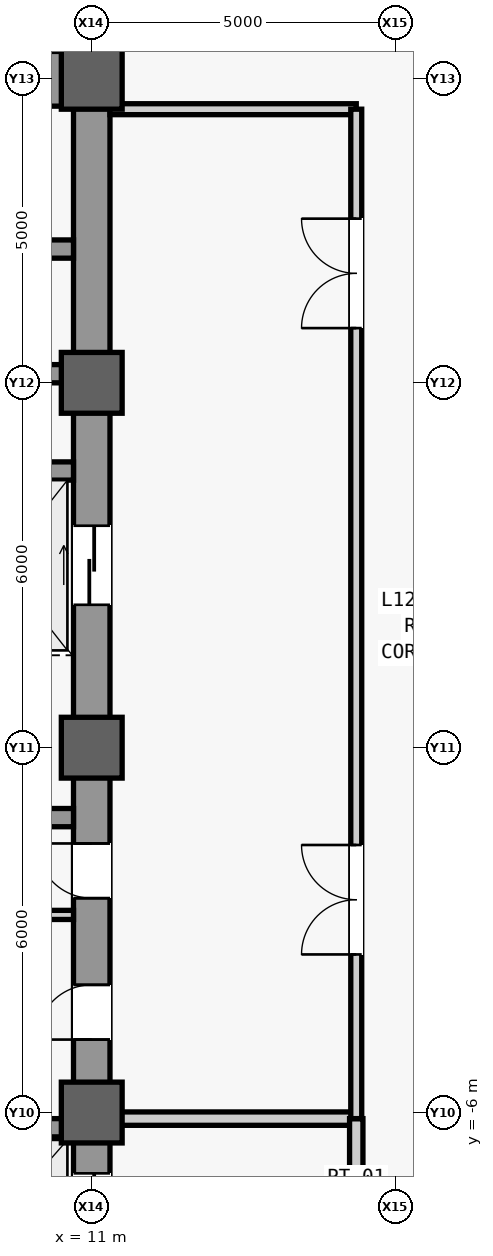
"""IFC4 building model, lengths in metres.
Left out: names, types, materials, properties, quantities, classifications, styles, units other than length and angle.
Written with IfcOpenShell. Run it as: python <this file> out.ifc"""

import sys

from ifc_helpers import new_model, si_unit, direction, frame, frame_2d, origin, origin_2d, place, context, subcontext, project, spatial, rectangle, extrude, source, transform, mapped, element, fill, save


model = new_model("IFC4")
c1 = context("Model", 3, precision=1e-05, world=origin(), true_north=direction((0.0, 1.0)))
c2 = subcontext(c1, "Body", "Model", "MODEL_VIEW")
j1 = project(units=[si_unit("LENGTHUNIT", "METRE"), si_unit("PLANEANGLEUNIT", "RADIAN")], contexts=[c1])
p1 = place(None, origin())
s1 = spatial("IfcSite", under=j1, at=p1, CompositionType="ELEMENT")
p2 = place(p1, origin())
s2 = spatial("IfcBuilding", under=s1, at=p2, CompositionType="ELEMENT")
p3 = place(p2, frame((0.0, 0.0, 57.8)))
s3 = spatial("IfcBuildingStorey", under=s2, at=p3, CompositionType="ELEMENT", Elevation=57.8)
m1 = source(origin(), c2, "Body", "SweptSolid", [
    extrude(rectangle(XDim=22.0, YDim=0.6, at=frame_2d((11.0, 0.0))), origin(), (0.0, 0.0, 1.0), 3.94),
])
p4 = place(p3, frame((11.0, -11.0, 0.0), z_axis=(0.0, 0.0, 1.0), x_axis=(0.0, 1.0, 0.0)))
e1 = element("IfcWall", 1, at=p4, inside=s3, PredefinedType="SHEAR", context=c2, shape_type="MappedRepresentation", body=[
    mapped(m1, transform((0.0, 0.0, 0.0), scale=1.0)),
])
m2 = source(origin(), c2, "Body", "SweptSolid", [
    extrude(rectangle(XDim=1.1, YDim=2.2, at=frame_2d((0.55, 1.1))), frame((0.0, 0.31, 0.0), z_axis=(0.0, -1.0, 0.0), x_axis=(1.0, 0.0, 0.0)), (0.0, 0.0, 1.0), 0.62),
])
p5 = place(p4, frame((0.8, 0.0, 0.0)))
e2 = element("IfcOpeningElement", 2, at=p5, cuts=e1, PredefinedType="OPENING", context=c2, shape_type="MappedRepresentation", body=[
    mapped(m2, transform((0.0, 0.0, 0.0), scale=1.0)),
])
m3 = source(origin(), c2, "Body", "SweptSolid", [
    extrude(rectangle(XDim=0.9, YDim=2.15, at=frame_2d((0.45, 1.075))), frame((0.0, 0.31, 0.0), z_axis=(0.0, -1.0, 0.0), x_axis=(1.0, 0.0, 0.0)), (0.0, 0.0, 1.0), 0.62),
])
p6 = place(p4, frame((6.2, 0.0, 0.0)))
e3 = element("IfcOpeningElement", 3, at=p6, cuts=e1, PredefinedType="OPENING", context=c2, shape_type="MappedRepresentation", body=[
    mapped(m3, transform((0.0, 0.0, 0.0), scale=1.0)),
])
p7 = place(p4, frame((8.525, 0.0, 0.0)))
e4 = element("IfcOpeningElement", 4, at=p7, cuts=e1, PredefinedType="OPENING", context=c2, shape_type="MappedRepresentation", body=[
    mapped(m3, transform((0.0, 0.0, 0.0), scale=1.0)),
])
m4 = source(origin(), c2, "Body", "SweptSolid", [
    extrude(rectangle(XDim=1.3, YDim=2.3, at=frame_2d((0.65, 1.15))), frame((0.0, 0.31, 0.0), z_axis=(0.0, -1.0, 0.0), x_axis=(1.0, 0.0, 0.0)), (0.0, 0.0, 1.0), 0.62),
])
p8 = place(p4, frame((2.7, 0.0, 0.0)))
e5 = element("IfcOpeningElement", 5, at=p8, cuts=e1, PredefinedType="OPENING", context=c2, shape_type="MappedRepresentation", body=[
    mapped(m4, transform((0.0, 0.0, 0.0), scale=1.0)),
])
p9 = place(p4, frame((13.35, 0.0, 0.0)))
e6 = element("IfcOpeningElement", 6, at=p9, cuts=e1, PredefinedType="OPENING", context=c2, shape_type="MappedRepresentation", body=[
    mapped(m4, transform((0.0, 0.0, 0.0), scale=1.0)),
])
m5 = source(origin(), c2, "Body", "SweptSolid", [
    extrude(rectangle(XDim=5.85, YDim=0.9, at=frame_2d((2.925, 0.0))), origin(), (0.0, 0.0, 1.0), 3.94),
])
p10 = place(p3, frame((4.85, 11.0, 0.0), z_axis=(0.0, 0.0, 1.0), x_axis=(1.0, 0.0, 0.0)))
e7 = element("IfcWall", 7, at=p10, inside=s3, PredefinedType="SHEAR", context=c2, shape_type="MappedRepresentation", body=[
    mapped(m5, transform((0.0, 0.0, 0.0), scale=1.0)),
])
m6 = source(origin(), c2, "Body", "SweptSolid", [
    extrude(rectangle(XDim=1.05, YDim=2.2, at=frame_2d((0.525, 1.1))), frame((0.0, 0.46, 0.0), z_axis=(0.0, -1.0, 0.0), x_axis=(1.0, 0.0, 0.0)), (0.0, 0.0, 1.0), 0.92),
])
p11 = place(p10, frame((1.375, 0.0, 0.0)))
e8 = element("IfcOpeningElement", 8, at=p11, cuts=e7, PredefinedType="OPENING", context=c2, shape_type="MappedRepresentation", body=[
    mapped(m6, transform((0.0, 0.0, 0.0), scale=1.0)),
])
m7 = source(origin(), c2, "Body", "SweptSolid", [
    extrude(rectangle(XDim=5.6, YDim=0.3, at=frame_2d((2.8, 0.0))), origin(), (0.0, 0.0, 1.0), 3.94),
])
p12 = place(p3, frame((5.1, -1.15, 0.0), z_axis=(0.0, 0.0, 1.0), x_axis=(1.0, 0.0, 0.0)))
e9 = element("IfcWall", 9, at=p12, inside=s3, PredefinedType="SHEAR", context=c2, shape_type="MappedRepresentation", body=[
    mapped(m7, transform((0.0, 0.0, 0.0), scale=1.0)),
])
m8 = source(origin(), c2, "Body", "SweptSolid", [
    extrude(rectangle(XDim=1.0, YDim=1.0, at=origin_2d()), origin(), (0.0, 0.0, 1.0), 4.2),
])
for number, where, z_axis, x_axis in (
    (10, (11.0, -6.0, 0.0), (0.0, 0.0, 1.0), (1.0, 0.0, 0.0)),
    (11, (11.0, 0.0, 0.0), (0.0, 0.0, 1.0), (1.0, 0.0, 0.0)),
    (12, (11.0, 6.0, 0.0), (0.0, 0.0, 1.0), (1.0, 0.0, 0.0)),
    (13, (11.0, 11.0, 0.0), (0.0, 0.0, 1.0), (1.0, 0.0, 0.0)),
):
    element("IfcColumn", number, at=place(p3, frame(where, z_axis=z_axis, x_axis=x_axis)), inside=s3, PredefinedType="COLUMN", context=c2, shape_type="MappedRepresentation", body=[
        mapped(m8, transform((0.0, 0.0, 0.0), scale=1.0)),
    ])
m9 = source(origin(), c2, "Body", "SweptSolid", [
    extrude(rectangle(XDim=2.2, YDim=0.3, at=frame_2d((1.1, 0.0))), origin(), (0.0, 0.0, 1.0), 3.94),
])
p13 = place(p3, frame((8.5, -6.25, 0.0), z_axis=(0.0, 0.0, 1.0), x_axis=(1.0, 0.0, 0.0)))
e14 = element("IfcWall", 14, at=p13, inside=s3, PredefinedType="SHEAR", context=c2, shape_type="MappedRepresentation", body=[
    mapped(m9, transform((0.0, 0.0, 0.0), scale=1.0)),
])
m10 = source(origin(), c2, "Body", "SweptSolid", [
    extrude(rectangle(XDim=2.3, YDim=0.3, at=frame_2d((1.15, 0.0))), origin(), (0.0, 0.0, 1.0), 3.94),
])
for number, where, z_axis, x_axis in (
    (15, (8.4, 4.55, 0.0), (0.0, 0.0, 1.0), (1.0, 0.0, 0.0)),
    (16, (8.4, 6.15, 0.0), (0.0, 0.0, 1.0), (1.0, 0.0, 0.0)),
    (17, (8.4, 8.2, 0.0), (0.0, 0.0, 1.0), (1.0, 0.0, 0.0)),
):
    element("IfcWall", number, at=place(p3, frame(where, z_axis=z_axis, x_axis=x_axis)), inside=s3, PredefinedType="SHEAR", context=c2, shape_type="MappedRepresentation", body=[
        mapped(m10, transform((0.0, 0.0, 0.0), scale=1.0)),
    ])
m11 = source(origin(), c2, "Body", "SweptSolid", [
    extrude(rectangle(XDim=2.05, YDim=0.15, at=frame_2d((1.025, 0.0))), origin(), (0.0, 0.0, 1.0), 3.94),
])
p14 = place(p3, frame((8.65, -2.75, 0.0), z_axis=(0.0, 0.0, 1.0), x_axis=(1.0, 0.0, 0.0)))
e18 = element("IfcWall", 18, at=p14, inside=s3, PredefinedType="PARTITIONING", context=c2, shape_type="MappedRepresentation", body=[
    mapped(m11, transform((0.0, 0.0, 0.0), scale=1.0)),
])
m12 = source(origin(), c2, "Body", "SweptSolid", [
    extrude(rectangle(XDim=4.05, YDim=0.22, at=frame_2d((2.025, 0.0))), origin(), (0.0, 0.0, 1.0), 3.085),
])
p15 = place(p3, frame((11.3, -6.1, 0.0), z_axis=(0.0, 0.0, 1.0), x_axis=(1.0, 0.0, 0.0)))
e19 = element("IfcWall", 19, at=p15, inside=s3, PredefinedType="PARTITIONING", context=c2, shape_type="MappedRepresentation", body=[
    mapped(m12, transform((0.0, 0.0, 0.0), scale=1.0)),
])
m13 = source(origin(), c2, "Body", "SweptSolid", [
    extrude(rectangle(XDim=4.4, YDim=0.22, at=frame_2d((2.2, 0.0))), origin(), (0.0, 0.0, 1.0), 3.94),
])
p16 = place(p3, frame((15.35, -10.5, 0.0), z_axis=(0.0, 0.0, 1.0), x_axis=(0.0, 1.0, 0.0)))
e20 = element("IfcWall", 20, at=p16, inside=s3, PredefinedType="PARTITIONING", context=c2, shape_type="MappedRepresentation", body=[
    mapped(m13, transform((0.0, 0.0, 0.0), scale=1.0)),
])
m14 = source(origin(), c2, "Body", "SweptSolid", [
    extrude(rectangle(XDim=1.2, YDim=2.2, at=frame_2d((0.6, 1.1))), frame((0.0, 0.12, 0.0), z_axis=(0.0, -1.0, 0.0), x_axis=(1.0, 0.0, 0.0)), (0.0, 0.0, 1.0), 0.24),
])
p17 = place(p16, frame((1.6, 0.0, 0.0)))
e21 = element("IfcOpeningElement", 21, at=p17, cuts=e20, PredefinedType="OPENING", context=c2, shape_type="MappedRepresentation", body=[
    mapped(m14, transform((0.0, 0.0, 0.0), scale=1.0)),
])
m15 = source(origin(), c2, "Body", "SweptSolid", [
    extrude(rectangle(XDim=4.05, YDim=0.18, at=frame_2d((2.025, 0.0))), origin(), (0.0, 0.0, 1.0), 3.94),
])
p18 = place(p3, frame((11.3, 10.5, 0.0), z_axis=(0.0, 0.0, 1.0), x_axis=(1.0, 0.0, 0.0)))
e22 = element("IfcWall", 22, at=p18, inside=s3, PredefinedType="PARTITIONING", context=c2, shape_type="MappedRepresentation", body=[
    mapped(m15, transform((0.0, 0.0, 0.0), scale=1.0)),
])
m16 = source(origin(), c2, "Body", "SweptSolid", [
    extrude(rectangle(XDim=16.6, YDim=0.18, at=frame_2d((8.3, 0.0))), origin(), (0.0, 0.0, 1.0), 3.94),
])
p19 = place(p3, frame((15.35, -6.1, 0.0), z_axis=(0.0, 0.0, 1.0), x_axis=(0.0, 1.0, 0.0)))
e23 = element("IfcWall", 23, at=p19, inside=s3, PredefinedType="PARTITIONING", context=c2, shape_type="MappedRepresentation", body=[
    mapped(m16, transform((0.0, 0.0, 0.0), scale=1.0)),
])
m17 = source(origin(), c2, "Body", "SweptSolid", [
    extrude(rectangle(XDim=1.8, YDim=2.25, at=frame_2d((0.9, 1.125))), frame((0.0, 0.1, 0.0), z_axis=(0.0, -1.0, 0.0), x_axis=(1.0, 0.0, 0.0)), (0.0, 0.0, 1.0), 0.2),
])
p20 = place(p19, frame((2.7, 0.0, 0.0)))
e24 = element("IfcOpeningElement", 24, at=p20, cuts=e23, PredefinedType="OPENING", context=c2, shape_type="MappedRepresentation", body=[
    mapped(m17, transform((0.0, 0.0, 0.0), scale=1.0)),
])
p21 = place(p19, frame((13.0, 0.0, 0.0)))
e25 = element("IfcOpeningElement", 25, at=p21, cuts=e23, PredefinedType="OPENING", context=c2, shape_type="MappedRepresentation", body=[
    mapped(m17, transform((0.0, 0.0, 0.0), scale=1.0)),
])
m18 = source(origin(), c2, "Body", "SweptSolid", [
    extrude(rectangle(XDim=0.9, YDim=2.15, at=frame_2d((0.45, 1.075))), frame((0.0, 0.025, 0.0), z_axis=(0.0, -1.0, 0.0), x_axis=(1.0, 0.0, 0.0)), (0.0, 0.0, 1.0), 0.05),
])
p22 = place(p6, origin())
e26 = element("IfcDoor", 26, at=p22, inside=s3, OperationType="SINGLE_SWING_LEFT", PredefinedType="DOOR", context=c2, shape_type="MappedRepresentation", body=[
    mapped(m18, transform((0.0, 0.0, 0.0), scale=1.0)),
])
fill(e3, e26)
p23 = place(p7, origin())
e27 = element("IfcDoor", 27, at=p23, inside=s3, OperationType="SINGLE_SWING_RIGHT", PredefinedType="DOOR", context=c2, shape_type="MappedRepresentation", body=[
    mapped(m18, transform((0.0, 0.0, 0.0), scale=1.0)),
])
fill(e4, e27)
m19 = source(origin(), c2, "Body", "SweptSolid", [
    extrude(rectangle(XDim=1.8, YDim=2.25, at=frame_2d((0.9, 1.125))), frame((0.0, 0.025, 0.0), z_axis=(0.0, -1.0, 0.0), x_axis=(1.0, 0.0, 0.0)), (0.0, 0.0, 1.0), 0.05),
])
p24 = place(p20, origin())
e28 = element("IfcDoor", 28, at=p24, inside=s3, OperationType="SINGLE_SWING_RIGHT", PredefinedType="DOOR", context=c2, shape_type="MappedRepresentation", body=[
    mapped(m19, transform((0.0, 0.0, 0.0), scale=1.0)),
])
fill(e24, e28)
p25 = place(p21, origin())
e29 = element("IfcDoor", 29, at=p25, inside=s3, OperationType="SINGLE_SWING_LEFT", PredefinedType="DOOR", context=c2, shape_type="MappedRepresentation", body=[
    mapped(m19, transform((0.0, 0.0, 0.0), scale=1.0)),
])
fill(e25, e29)
m20 = source(origin(), c2, "Body", "SweptSolid", [
    extrude(rectangle(XDim=1.3, YDim=2.3, at=frame_2d((0.65, 1.15))), frame((0.0, 0.025, 0.0), z_axis=(0.0, -1.0, 0.0), x_axis=(1.0, 0.0, 0.0)), (0.0, 0.0, 1.0), 0.05),
])
p26 = place(p8, origin())
e30 = element("IfcDoor", 30, at=p26, inside=s3, OperationType="SLIDING_TO_LEFT", PredefinedType="DOOR", context=c2, shape_type="MappedRepresentation", body=[
    mapped(m20, transform((0.0, 0.0, 0.0), scale=1.0)),
])
fill(e5, e30)
p27 = place(p9, origin())
e31 = element("IfcDoor", 31, at=p27, inside=s3, OperationType="SLIDING_TO_LEFT", PredefinedType="DOOR", context=c2, shape_type="MappedRepresentation", body=[
    mapped(m20, transform((0.0, 0.0, 0.0), scale=1.0)),
])
fill(e6, e31)
save(model, sys.argv[1])
